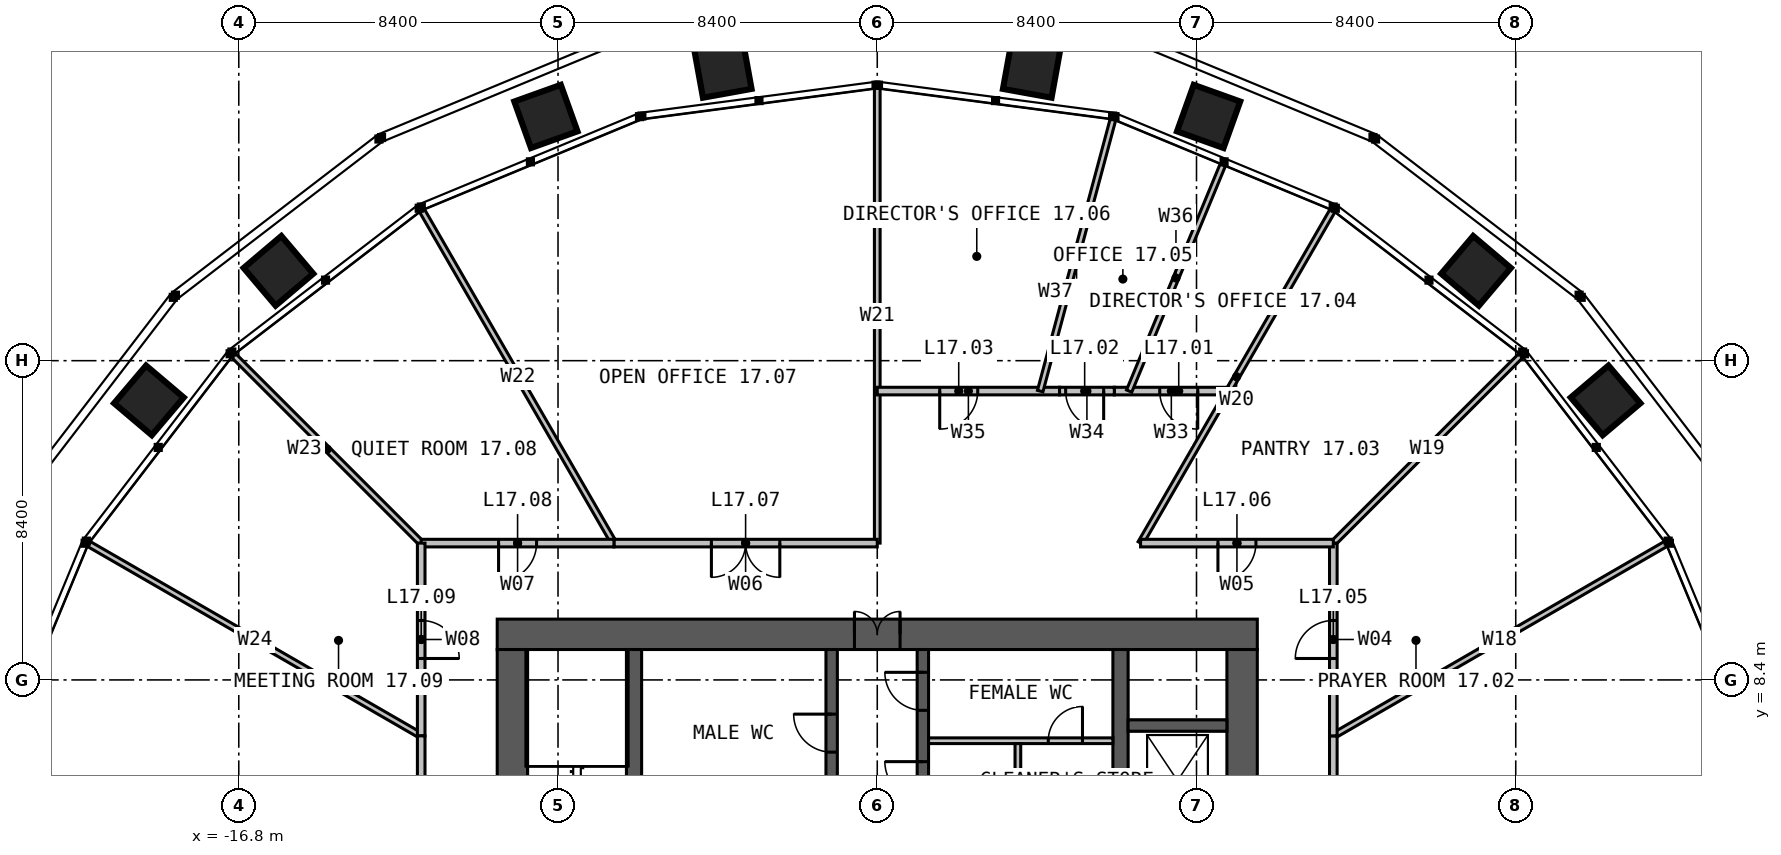
"""IFC4 building model, lengths in metres.
Left out: names, types, materials, properties, quantities, classifications, styles, units other than length and angle.
Written with IfcOpenShell. Run it as: python <this file> out.ifc"""

import sys

from ifc_helpers import new_model, si_unit, direction, frame, frame_2d, origin, place, context, subcontext, project, spatial, rectangle, extrude, element, fill, save


model = new_model("IFC4")
c1 = context("Model", 3, precision=1e-05, world=origin(), true_north=direction((0.0, 1.0)))
c2 = subcontext(c1, "Body", "Model", "MODEL_VIEW")
j1 = project(units=[si_unit("LENGTHUNIT", "METRE"), si_unit("PLANEANGLEUNIT", "RADIAN")], contexts=[c1])
p1 = place(None, origin())
s1 = spatial("IfcSite", under=j1, at=p1, CompositionType="ELEMENT")
p2 = place(p1, origin())
s2 = spatial("IfcBuilding", under=s1, at=p2, CompositionType="ELEMENT")
p3 = place(p2, frame((0.0, 0.0, 73.0)))
s3 = spatial("IfcBuildingStorey", under=s2, at=p3, CompositionType="ELEMENT", Elevation=73.0)
p4 = place(p3, frame((-10.0, 9.6, 0.0), z_axis=(0.0, 0.0, 1.0), x_axis=(1.0, 0.0, 0.0)))
e1 = element("IfcWall", 1, at=p4, inside=s3, PredefinedType="SOLIDWALL", context=c2, shape_type="SweptSolid", body=[
    extrude(rectangle(XDim=20.0, YDim=0.8, at=frame_2d((10.0, 0.0))), origin(), (0.0, 0.0, 1.0), 4.0),
])
p5 = place(p4, frame((9.4, 0.0, 0.0)))
e2 = element("IfcOpeningElement", 2, at=p5, cuts=e1, PredefinedType="OPENING", context=c2, shape_type="SweptSolid", body=[
    extrude(rectangle(XDim=1.2, YDim=2.2, at=frame_2d((0.6, 1.1))), frame((0.0, 0.41, 0.0), z_axis=(0.0, -1.0, 0.0), x_axis=(1.0, 0.0, 0.0)), (0.0, 0.0, 1.0), 0.82),
])
for number, where, z_axis, x_axis in (
    (3, (9.6, -9.2, 0.0), (0.0, 0.0, 1.0), (0.0, 1.0, 0.0)),
    (4, (-9.6, 9.2, 0.0), (0.0, 0.0, 1.0), (0.0, -1.0, 0.0)),
):
    element("IfcWall", number, at=place(p3, frame(where, z_axis=z_axis, x_axis=x_axis)), inside=s3, PredefinedType="SOLIDWALL", context=c2, shape_type="SweptSolid", body=[
        extrude(rectangle(XDim=18.4, YDim=0.8, at=frame_2d((9.2, 0.0))), origin(), (0.0, 0.0, 1.0), 4.0),
    ])
p6 = place(p3, frame((-6.4, -9.2, 0.0), z_axis=(0.0, 0.0, 1.0), x_axis=(0.0, 1.0, 0.0)))
e5 = element("IfcWall", 5, at=p6, inside=s3, PredefinedType="SOLIDWALL", context=c2, shape_type="SweptSolid", body=[
    extrude(rectangle(XDim=18.4, YDim=0.4, at=frame_2d((9.2, 0.0))), origin(), (0.0, 0.0, 1.0), 4.0),
])
p7 = place(p6, frame((8.7, 0.0, 0.0)))
e6 = element("IfcOpeningElement", 6, at=p7, cuts=e5, PredefinedType="OPENING", context=c2, shape_type="SweptSolid", body=[
    extrude(rectangle(XDim=1.0, YDim=2.2, at=frame_2d((0.5, 1.1))), frame((0.0, 0.21, 0.0), z_axis=(0.0, -1.0, 0.0), x_axis=(1.0, 0.0, 0.0)), (0.0, 0.0, 1.0), 0.42),
])
p8 = place(p3, frame((6.4, 9.2, 0.0), z_axis=(0.0, 0.0, 1.0), x_axis=(0.0, -1.0, 0.0)))
e7 = element("IfcWall", 7, at=p8, inside=s3, PredefinedType="SOLIDWALL", context=c2, shape_type="SweptSolid", body=[
    extrude(rectangle(XDim=18.4, YDim=0.4, at=frame_2d((9.2, 0.0))), origin(), (0.0, 0.0, 1.0), 4.0),
])
p9 = place(p8, frame((8.7, 0.0, 0.0)))
e8 = element("IfcOpeningElement", 8, at=p9, cuts=e7, PredefinedType="OPENING", context=c2, shape_type="SweptSolid", body=[
    extrude(rectangle(XDim=1.0, YDim=2.2, at=frame_2d((0.5, 1.1))), frame((0.0, 0.21, 0.0), z_axis=(0.0, -1.0, 0.0), x_axis=(1.0, 0.0, 0.0)), (0.0, 0.0, 1.0), 0.42),
])
p10 = place(p3, frame((-1.2, 1.45, 0.0), z_axis=(0.0, 0.0, 1.0), x_axis=(0.0, 1.0, 0.0)))
e9 = element("IfcWall", 9, at=p10, inside=s3, PredefinedType="SOLIDWALL", context=c2, shape_type="SweptSolid", body=[
    extrude(rectangle(XDim=7.75, YDim=0.3, at=frame_2d((3.875, 0.0))), origin(), (0.0, 0.0, 1.0), 4.0),
])
p11 = place(p10, frame((5.05, 0.0, 0.0)))
e10 = element("IfcOpeningElement", 10, at=p11, cuts=e9, PredefinedType="OPENING", context=c2, shape_type="SweptSolid", body=[
    extrude(rectangle(XDim=1.0, YDim=2.2, at=frame_2d((0.5, 1.1))), frame((0.0, 0.16, 0.0), z_axis=(0.0, -1.0, 0.0), x_axis=(1.0, 0.0, 0.0)), (0.0, 0.0, 1.0), 0.32),
])
p12 = place(p3, frame((1.2, 1.45, 0.0), z_axis=(0.0, 0.0, 1.0), x_axis=(0.0, 1.0, 0.0)))
e11 = element("IfcWall", 11, at=p12, inside=s3, PredefinedType="SOLIDWALL", context=c2, shape_type="SweptSolid", body=[
    extrude(rectangle(XDim=7.75, YDim=0.3, at=frame_2d((3.875, 0.0))), origin(), (0.0, 0.0, 1.0), 4.0),
])
p13 = place(p12, frame((3.8, 0.0, 0.0)))
e12 = element("IfcOpeningElement", 12, at=p13, cuts=e11, PredefinedType="OPENING", context=c2, shape_type="SweptSolid", body=[
    extrude(rectangle(XDim=1.0, YDim=2.2, at=frame_2d((0.5, 1.1))), frame((0.0, 0.16, 0.0), z_axis=(0.0, -1.0, 0.0), x_axis=(1.0, 0.0, 0.0)), (0.0, 0.0, 1.0), 0.32),
])
p14 = place(p12, frame((6.15, 0.0, 0.0)))
e13 = element("IfcOpeningElement", 13, at=p14, cuts=e11, PredefinedType="OPENING", context=c2, shape_type="SweptSolid", body=[
    extrude(rectangle(XDim=1.0, YDim=2.2, at=frame_2d((0.5, 1.1))), frame((0.0, 0.16, 0.0), z_axis=(0.0, -1.0, 0.0), x_axis=(1.0, 0.0, 0.0)), (0.0, 0.0, 1.0), 0.32),
])
p15 = place(p3, frame((6.6, 7.2, 0.0), z_axis=(0.0, 0.0, 1.0), x_axis=(1.0, 0.0, 0.0)))
e14 = element("IfcWall", 14, at=p15, inside=s3, PredefinedType="SOLIDWALL", context=c2, shape_type="SweptSolid", body=[
    extrude(rectangle(XDim=2.6, YDim=0.3, at=frame_2d((1.3, 0.0))), origin(), (0.0, 0.0, 1.0), 4.0),
])
p16 = place(p3, frame((1.35, 6.8, 0.0), z_axis=(0.0, 0.0, 1.0), x_axis=(1.0, 0.0, 0.0)))
e15 = element("IfcWall", 15, at=p16, inside=s3, PredefinedType="PARTITIONING", context=c2, shape_type="SweptSolid", body=[
    extrude(rectangle(XDim=4.85, YDim=0.15, at=frame_2d((2.425, 0.0))), origin(), (0.0, 0.0, 1.0), 3.75),
])
p17 = place(p16, frame((3.15, 0.0, 0.0)))
e16 = element("IfcOpeningElement", 16, at=p17, cuts=e15, PredefinedType="OPENING", context=c2, shape_type="SweptSolid", body=[
    extrude(rectangle(XDim=0.9, YDim=2.2, at=frame_2d((0.45, 1.1))), frame((0.0, 0.085, 0.0), z_axis=(0.0, -1.0, 0.0), x_axis=(1.0, 0.0, 0.0)), (0.0, 0.0, 1.0), 0.17),
])
p18 = place(p3, frame((3.7, 4.75, 0.0), z_axis=(0.0, 0.0, 1.0), x_axis=(0.0, 1.0, 0.0)))
e17 = element("IfcWall", 17, at=p18, inside=s3, PredefinedType="PARTITIONING", context=c2, shape_type="SweptSolid", body=[
    extrude(rectangle(XDim=1.975, YDim=0.15, at=frame_2d((0.988, 0.0))), origin(), (0.0, 0.0, 1.0), 3.75),
])
p19 = place(p3, frame((12.0, 6.928, 0.0), z_axis=(0.0, 0.0, 1.0), x_axis=(0.866023860286, 0.500002673408, 0.0)))
e18 = element("IfcWall", 18, at=p19, inside=s3, PredefinedType="PARTITIONING", context=c2, shape_type="SweptSolid", body=[
    extrude(rectangle(XDim=10.106, YDim=0.15, at=frame_2d((5.053, 0.0))), origin(), (0.0, 0.0, 1.0), 2.79),
])
p20 = place(p3, frame((12.0, 12.0, 0.0), z_axis=(0.0, 0.0, 1.0), x_axis=(0.707106781187, 0.707106781187, 0.0)))
e19 = element("IfcWall", 19, at=p20, inside=s3, PredefinedType="PARTITIONING", context=c2, shape_type="SweptSolid", body=[
    extrude(rectangle(XDim=6.992, YDim=0.15, at=frame_2d((3.496, 0.0))), origin(), (0.0, 0.0, 1.0), 2.79),
])
p21 = place(p3, frame((6.928, 12.0, 0.0), z_axis=(0.0, 0.0, 1.0), x_axis=(0.500002673408, 0.866023860286, 0.0)))
e20 = element("IfcWall", 20, at=p21, inside=s3, PredefinedType="PARTITIONING", context=c2, shape_type="SweptSolid", body=[
    extrude(rectangle(XDim=10.106, YDim=0.15, at=frame_2d((5.053, 0.0))), origin(), (0.0, 0.0, 1.0), 2.79),
])
p22 = place(p3, frame((0.0, 12.0, 0.0), z_axis=(0.0, 0.0, 1.0), x_axis=(0.0, 1.0, 0.0)))
e21 = element("IfcWall", 21, at=p22, inside=s3, PredefinedType="PARTITIONING", context=c2, shape_type="SweptSolid", body=[
    extrude(rectangle(XDim=11.962, YDim=0.15, at=frame_2d((5.981, 0.0))), origin(), (0.0, 0.0, 1.0), 2.79),
])
p23 = place(p3, frame((-6.928, 12.0, 0.0), z_axis=(0.0, 0.0, 1.0), x_axis=(-0.500002673408, 0.866023860286, 0.0)))
e22 = element("IfcWall", 22, at=p23, inside=s3, PredefinedType="PARTITIONING", context=c2, shape_type="SweptSolid", body=[
    extrude(rectangle(XDim=10.106, YDim=0.15, at=frame_2d((5.053, 0.0))), origin(), (0.0, 0.0, 1.0), 2.79),
])
p24 = place(p3, frame((-12.0, 12.0, 0.0), z_axis=(0.0, 0.0, 1.0), x_axis=(-0.707106781187, 0.707106781187, 0.0)))
e23 = element("IfcWall", 23, at=p24, inside=s3, PredefinedType="PARTITIONING", context=c2, shape_type="SweptSolid", body=[
    extrude(rectangle(XDim=6.992, YDim=0.15, at=frame_2d((3.496, 0.0))), origin(), (0.0, 0.0, 1.0), 2.79),
])
p25 = place(p3, frame((-12.0, 6.928, 0.0), z_axis=(0.0, 0.0, 1.0), x_axis=(-0.866023860286, 0.500002673408, 0.0)))
e24 = element("IfcWall", 24, at=p25, inside=s3, PredefinedType="PARTITIONING", context=c2, shape_type="SweptSolid", body=[
    extrude(rectangle(XDim=10.106, YDim=0.15, at=frame_2d((5.053, 0.0))), origin(), (0.0, 0.0, 1.0), 2.79),
])
p26 = place(p3, frame((12.0, -6.928, 0.0), z_axis=(0.0, 0.0, 1.0), x_axis=(0.0, 1.0, 0.0)))
e25 = element("IfcWall", 25, at=p26, inside=s3, PredefinedType="PARTITIONING", context=c2, shape_type="SweptSolid", body=[
    extrude(rectangle(XDim=13.856, YDim=0.2, at=frame_2d((6.928, 0.0))), origin(), (0.0, 0.0, 1.0), 3.8),
])
p27 = place(p26, frame((6.028, 0.0, 0.0)))
e26 = element("IfcOpeningElement", 26, at=p27, cuts=e25, PredefinedType="OPENING", context=c2, shape_type="SweptSolid", body=[
    extrude(rectangle(XDim=1.8, YDim=2.2, at=frame_2d((0.9, 1.1))), frame((0.0, 0.11, 0.0), z_axis=(0.0, -1.0, 0.0), x_axis=(1.0, 0.0, 0.0)), (0.0, 0.0, 1.0), 0.22),
])
p28 = place(p3, frame((12.0, 6.928, 0.0), z_axis=(0.0, 0.0, 1.0), x_axis=(0.0, 1.0, 0.0)))
e27 = element("IfcWall", 27, at=p28, inside=s3, PredefinedType="PARTITIONING", context=c2, shape_type="SweptSolid", body=[
    extrude(rectangle(XDim=5.072, YDim=0.2, at=frame_2d((2.536, 0.0))), origin(), (0.0, 0.0, 1.0), 3.8),
])
p29 = place(p28, frame((2.036, 0.0, 0.0)))
e28 = element("IfcOpeningElement", 28, at=p29, cuts=e27, PredefinedType="OPENING", context=c2, shape_type="SweptSolid", body=[
    extrude(rectangle(XDim=1.0, YDim=2.2, at=frame_2d((0.5, 1.1))), frame((0.0, 0.11, 0.0), z_axis=(0.0, -1.0, 0.0), x_axis=(1.0, 0.0, 0.0)), (0.0, 0.0, 1.0), 0.22),
])
p30 = place(p3, frame((12.0, 12.0, 0.0), z_axis=(0.0, 0.0, 1.0), x_axis=(-1.0, 0.0, 0.0)))
e29 = element("IfcWall", 29, at=p30, inside=s3, PredefinedType="PARTITIONING", context=c2, shape_type="SweptSolid", body=[
    extrude(rectangle(XDim=5.072, YDim=0.2, at=frame_2d((2.536, 0.0))), origin(), (0.0, 0.0, 1.0), 3.8),
])
p31 = place(p30, frame((2.036, 0.0, 0.0)))
e30 = element("IfcOpeningElement", 30, at=p31, cuts=e29, PredefinedType="OPENING", context=c2, shape_type="SweptSolid", body=[
    extrude(rectangle(XDim=1.0, YDim=2.2, at=frame_2d((0.5, 1.1))), frame((0.0, 0.11, 0.0), z_axis=(0.0, -1.0, 0.0), x_axis=(1.0, 0.0, 0.0)), (0.0, 0.0, 1.0), 0.22),
])
p32 = place(p3, frame((9.238, 16.0, 0.0), z_axis=(0.0, 0.0, 1.0), x_axis=(-1.0, 0.0, 0.0)))
e31 = element("IfcWall", 31, at=p32, inside=s3, PredefinedType="PARTITIONING", context=c2, shape_type="SweptSolid", body=[
    extrude(rectangle(XDim=3.0, YDim=0.2, at=frame_2d((1.5, 0.0))), origin(), (0.0, 0.0, 1.0), 3.8),
])
p33 = place(p32, frame((0.805, 0.0, 0.0)))
e32 = element("IfcOpeningElement", 32, at=p33, cuts=e31, PredefinedType="OPENING", context=c2, shape_type="SweptSolid", body=[
    extrude(rectangle(XDim=1.0, YDim=2.2, at=frame_2d((0.5, 1.1))), frame((0.0, 0.11, 0.0), z_axis=(0.0, -1.0, 0.0), x_axis=(1.0, 0.0, 0.0)), (0.0, 0.0, 1.0), 0.22),
])
p34 = place(p3, frame((6.238, 16.0, 0.0), z_axis=(0.0, 0.0, 1.0), x_axis=(-1.0, 0.0, 0.0)))
e33 = element("IfcWall", 33, at=p34, inside=s3, PredefinedType="PARTITIONING", context=c2, shape_type="SweptSolid", body=[
    extrude(rectangle(XDim=1.442, YDim=0.2, at=frame_2d((0.721, 0.0))), origin(), (0.0, 0.0, 1.0), 3.4),
])
p35 = place(p34, frame((0.28, 0.0, 0.0)))
e34 = element("IfcOpeningElement", 34, at=p35, cuts=e33, PredefinedType="OPENING", context=c2, shape_type="SweptSolid", body=[
    extrude(rectangle(XDim=1.0, YDim=2.2, at=frame_2d((0.5, 1.1))), frame((0.0, 0.11, 0.0), z_axis=(0.0, -1.0, 0.0), x_axis=(1.0, 0.0, 0.0)), (0.0, 0.0, 1.0), 0.22),
])
p36 = place(p3, frame((4.796, 16.0, 0.0), z_axis=(0.0, 0.0, 1.0), x_axis=(-1.0, 0.0, 0.0)))
e35 = element("IfcWall", 35, at=p36, inside=s3, PredefinedType="PARTITIONING", context=c2, shape_type="SweptSolid", body=[
    extrude(rectangle(XDim=4.796, YDim=0.2, at=frame_2d((2.398, 0.0))), origin(), (0.0, 0.0, 1.0), 3.8),
])
p37 = place(p36, frame((2.152, 0.0, 0.0)))
e36 = element("IfcOpeningElement", 36, at=p37, cuts=e35, PredefinedType="OPENING", context=c2, shape_type="SweptSolid", body=[
    extrude(rectangle(XDim=1.0, YDim=2.2, at=frame_2d((0.5, 1.1))), frame((0.0, 0.11, 0.0), z_axis=(0.0, -1.0, 0.0), x_axis=(1.0, 0.0, 0.0)), (0.0, 0.0, 1.0), 0.22),
])
p38 = place(p3, frame((6.627, 16.0, 0.0), z_axis=(0.0, 0.0, 1.0), x_axis=(0.382692246291, 0.923875881614, 0.0)))
e37 = element("IfcWall", 37, at=p38, inside=s3, PredefinedType="PARTITIONING", context=c2, shape_type="SweptSolid", body=[
    extrude(rectangle(XDim=6.439, YDim=0.15, at=frame_2d((3.219, 0.0))), origin(), (0.0, 0.0, 1.0), 2.79),
])
p39 = place(p3, frame((4.287, 16.0, 0.0), z_axis=(0.0, 0.0, 1.0), x_axis=(0.258831210147, 0.965922566593, 0.0)))
e38 = element("IfcWall", 38, at=p39, inside=s3, PredefinedType="PARTITIONING", context=c2, shape_type="SweptSolid", body=[
    extrude(rectangle(XDim=7.398, YDim=0.15, at=frame_2d((3.699, 0.0))), origin(), (0.0, 0.0, 1.0), 2.79),
])
p40 = place(p3, frame((0.0, 12.0, 0.0), z_axis=(0.0, 0.0, 1.0), x_axis=(-1.0, 0.0, 0.0)))
e39 = element("IfcWall", 39, at=p40, inside=s3, PredefinedType="PARTITIONING", context=c2, shape_type="SweptSolid", body=[
    extrude(rectangle(XDim=6.928, YDim=0.2, at=frame_2d((3.464, 0.0))), origin(), (0.0, 0.0, 1.0), 3.8),
])
p41 = place(p40, frame((2.564, 0.0, 0.0)))
e40 = element("IfcOpeningElement", 40, at=p41, cuts=e39, PredefinedType="OPENING", context=c2, shape_type="SweptSolid", body=[
    extrude(rectangle(XDim=1.8, YDim=2.2, at=frame_2d((0.9, 1.1))), frame((0.0, 0.11, 0.0), z_axis=(0.0, -1.0, 0.0), x_axis=(1.0, 0.0, 0.0)), (0.0, 0.0, 1.0), 0.22),
])
p42 = place(p3, frame((-6.928, 12.0, 0.0), z_axis=(0.0, 0.0, 1.0), x_axis=(-1.0, 0.0, 0.0)))
e41 = element("IfcWall", 41, at=p42, inside=s3, PredefinedType="PARTITIONING", context=c2, shape_type="SweptSolid", body=[
    extrude(rectangle(XDim=5.072, YDim=0.2, at=frame_2d((2.536, 0.0))), origin(), (0.0, 0.0, 1.0), 3.8),
])
p43 = place(p42, frame((2.036, 0.0, 0.0)))
e42 = element("IfcOpeningElement", 42, at=p43, cuts=e41, PredefinedType="OPENING", context=c2, shape_type="SweptSolid", body=[
    extrude(rectangle(XDim=1.0, YDim=2.2, at=frame_2d((0.5, 1.1))), frame((0.0, 0.11, 0.0), z_axis=(0.0, -1.0, 0.0), x_axis=(1.0, 0.0, 0.0)), (0.0, 0.0, 1.0), 0.22),
])
p44 = place(p3, frame((-12.0, 12.0, 0.0), z_axis=(0.0, 0.0, 1.0), x_axis=(0.0, -1.0, 0.0)))
e43 = element("IfcWall", 43, at=p44, inside=s3, PredefinedType="PARTITIONING", context=c2, shape_type="SweptSolid", body=[
    extrude(rectangle(XDim=5.072, YDim=0.2, at=frame_2d((2.536, 0.0))), origin(), (0.0, 0.0, 1.0), 3.8),
])
p45 = place(p44, frame((2.036, 0.0, 0.0)))
e44 = element("IfcOpeningElement", 44, at=p45, cuts=e43, PredefinedType="OPENING", context=c2, shape_type="SweptSolid", body=[
    extrude(rectangle(XDim=1.0, YDim=2.2, at=frame_2d((0.5, 1.1))), frame((0.0, 0.11, 0.0), z_axis=(0.0, -1.0, 0.0), x_axis=(1.0, 0.0, 0.0)), (0.0, 0.0, 1.0), 0.22),
])
p46 = place(p3, frame((-12.0, 6.928, 0.0), z_axis=(0.0, 0.0, 1.0), x_axis=(0.0, -1.0, 0.0)))
e45 = element("IfcWall", 45, at=p46, inside=s3, PredefinedType="PARTITIONING", context=c2, shape_type="SweptSolid", body=[
    extrude(rectangle(XDim=10.144, YDim=0.2, at=frame_2d((5.072, 0.0))), origin(), (0.0, 0.0, 1.0), 3.8),
])
p47 = place(p46, frame((4.172, 0.0, 0.0)))
e46 = element("IfcOpeningElement", 46, at=p47, cuts=e45, PredefinedType="OPENING", context=c2, shape_type="SweptSolid", body=[
    extrude(rectangle(XDim=1.8, YDim=2.2, at=frame_2d((0.9, 1.1))), frame((0.0, 0.11, 0.0), z_axis=(0.0, -1.0, 0.0), x_axis=(1.0, 0.0, 0.0)), (0.0, 0.0, 1.0), 0.22),
])
p48 = place(p5, origin())
e47 = element("IfcDoor", 47, at=p48, inside=s3, OperationType="DOUBLE_DOOR_SINGLE_SWING", PredefinedType="DOOR", context=c2, shape_type="SweptSolid", body=[
    extrude(rectangle(XDim=1.2, YDim=2.2, at=frame_2d((0.6, 1.1))), frame((0.0, 0.025, 0.0), z_axis=(0.0, -1.0, 0.0), x_axis=(1.0, 0.0, 0.0)), (0.0, 0.0, 1.0), 0.05),
])
fill(e2, e47)
p49 = place(p11, origin())
e48 = element("IfcDoor", 48, at=p49, inside=s3, OperationType="SINGLE_SWING_RIGHT", PredefinedType="DOOR", context=c2, shape_type="SweptSolid", body=[
    extrude(rectangle(XDim=1.0, YDim=2.2, at=frame_2d((0.5, 1.1))), frame((0.0, 0.025, 0.0), z_axis=(0.0, -1.0, 0.0), x_axis=(1.0, 0.0, 0.0)), (0.0, 0.0, 1.0), 0.05),
])
fill(e10, e48)
p50 = place(p13, origin())
e49 = element("IfcDoor", 49, at=p50, inside=s3, OperationType="SINGLE_SWING_RIGHT", PredefinedType="DOOR", context=c2, shape_type="SweptSolid", body=[
    extrude(rectangle(XDim=1.0, YDim=2.2, at=frame_2d((0.5, 1.1))), frame((0.0, 0.025, 0.0), z_axis=(0.0, -1.0, 0.0), x_axis=(1.0, 0.0, 0.0)), (0.0, 0.0, 1.0), 0.05),
])
fill(e12, e49)
p51 = place(p14, origin())
e50 = element("IfcDoor", 50, at=p51, inside=s3, OperationType="SINGLE_SWING_RIGHT", PredefinedType="DOOR", context=c2, shape_type="SweptSolid", body=[
    extrude(rectangle(XDim=1.0, YDim=2.2, at=frame_2d((0.5, 1.1))), frame((0.0, 0.025, 0.0), z_axis=(0.0, -1.0, 0.0), x_axis=(1.0, 0.0, 0.0)), (0.0, 0.0, 1.0), 0.05),
])
fill(e13, e50)
p52 = place(p17, origin())
e51 = element("IfcDoor", 51, at=p52, inside=s3, OperationType="SINGLE_SWING_RIGHT", PredefinedType="DOOR", context=c2, shape_type="SweptSolid", body=[
    extrude(rectangle(XDim=0.9, YDim=2.2, at=frame_2d((0.45, 1.1))), frame((0.0, 0.025, 0.0), z_axis=(0.0, -1.0, 0.0), x_axis=(1.0, 0.0, 0.0)), (0.0, 0.0, 1.0), 0.05),
])
fill(e16, e51)
p53 = place(p29, origin())
e52 = element("IfcDoor", 52, at=p53, inside=s3, OperationType="SINGLE_SWING_LEFT", PredefinedType="DOOR", context=c2, shape_type="SweptSolid", body=[
    extrude(rectangle(XDim=1.0, YDim=2.2, at=frame_2d((0.5, 1.1))), frame((0.0, 0.025, 0.0), z_axis=(0.0, -1.0, 0.0), x_axis=(1.0, 0.0, 0.0)), (0.0, 0.0, 1.0), 0.05),
])
fill(e28, e52)
p54 = place(p31, origin())
e53 = element("IfcDoor", 53, at=p54, inside=s3, OperationType="SINGLE_SWING_RIGHT", PredefinedType="DOOR", context=c2, shape_type="SweptSolid", body=[
    extrude(rectangle(XDim=1.0, YDim=2.2, at=frame_2d((0.5, 1.1))), frame((0.0, 0.025, 0.0), z_axis=(0.0, -1.0, 0.0), x_axis=(1.0, 0.0, 0.0)), (0.0, 0.0, 1.0), 0.05),
])
fill(e30, e53)
p55 = place(p33, origin())
e54 = element("IfcDoor", 54, at=p55, inside=s3, OperationType="SINGLE_SWING_LEFT", PredefinedType="DOOR", context=c2, shape_type="SweptSolid", body=[
    extrude(rectangle(XDim=1.0, YDim=2.2, at=frame_2d((0.5, 1.1))), frame((0.0, 0.025, 0.0), z_axis=(0.0, -1.0, 0.0), x_axis=(1.0, 0.0, 0.0)), (0.0, 0.0, 1.0), 0.05),
])
fill(e32, e54)
p56 = place(p35, origin())
e55 = element("IfcDoor", 55, at=p56, inside=s3, OperationType="SINGLE_SWING_LEFT", PredefinedType="DOOR", context=c2, shape_type="SweptSolid", body=[
    extrude(rectangle(XDim=1.0, YDim=2.2, at=frame_2d((0.5, 1.1))), frame((0.0, 0.025, 0.0), z_axis=(0.0, -1.0, 0.0), x_axis=(1.0, 0.0, 0.0)), (0.0, 0.0, 1.0), 0.05),
])
fill(e34, e55)
p57 = place(p37, origin())
e56 = element("IfcDoor", 56, at=p57, inside=s3, OperationType="SINGLE_SWING_RIGHT", PredefinedType="DOOR", context=c2, shape_type="SweptSolid", body=[
    extrude(rectangle(XDim=1.0, YDim=2.2, at=frame_2d((0.5, 1.1))), frame((0.0, 0.025, 0.0), z_axis=(0.0, -1.0, 0.0), x_axis=(1.0, 0.0, 0.0)), (0.0, 0.0, 1.0), 0.05),
])
fill(e36, e56)
p58 = place(p41, origin())
e57 = element("IfcDoor", 57, at=p58, inside=s3, OperationType="DOUBLE_DOOR_SINGLE_SWING", PredefinedType="DOOR", context=c2, shape_type="SweptSolid", body=[
    extrude(rectangle(XDim=1.8, YDim=2.2, at=frame_2d((0.9, 1.1))), frame((0.0, 0.025, 0.0), z_axis=(0.0, -1.0, 0.0), x_axis=(1.0, 0.0, 0.0)), (0.0, 0.0, 1.0), 0.05),
])
fill(e40, e57)
p59 = place(p43, origin())
e58 = element("IfcDoor", 58, at=p59, inside=s3, OperationType="SINGLE_SWING_RIGHT", PredefinedType="DOOR", context=c2, shape_type="SweptSolid", body=[
    extrude(rectangle(XDim=1.0, YDim=2.2, at=frame_2d((0.5, 1.1))), frame((0.0, 0.025, 0.0), z_axis=(0.0, -1.0, 0.0), x_axis=(1.0, 0.0, 0.0)), (0.0, 0.0, 1.0), 0.05),
])
fill(e42, e58)
p60 = place(p45, origin())
e59 = element("IfcDoor", 59, at=p60, inside=s3, OperationType="SINGLE_SWING_RIGHT", PredefinedType="DOOR", context=c2, shape_type="SweptSolid", body=[
    extrude(rectangle(XDim=1.0, YDim=2.2, at=frame_2d((0.5, 1.1))), frame((0.0, 0.025, 0.0), z_axis=(0.0, -1.0, 0.0), x_axis=(1.0, 0.0, 0.0)), (0.0, 0.0, 1.0), 0.05),
])
fill(e44, e59)
save(model, sys.argv[1])
